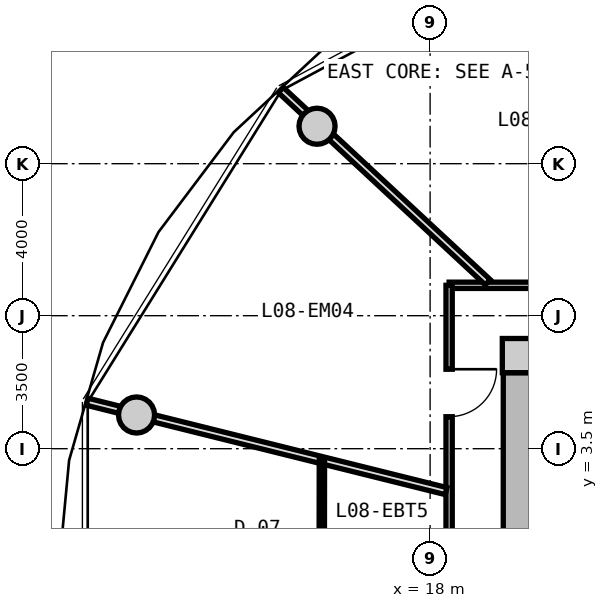
"""IFC4 building model, lengths in metres.
Left out: names, types, materials, properties, quantities, classifications, styles, units other than length and angle.
Written with IfcOpenShell. Run it as: python <this file> out.ifc"""

import sys

from ifc_helpers import new_model, si_unit, direction, frame, frame_2d, origin, origin_2d, place, context, subcontext, project, spatial, rectangle, circle, extrude, source, transform, mapped, element, fill, save


model = new_model("IFC4")
c1 = context("Model", 3, precision=1e-05, world=origin(), true_north=direction((0.0, 1.0)))
c2 = subcontext(c1, "Body", "Model", "MODEL_VIEW")
j1 = project(units=[si_unit("LENGTHUNIT", "METRE"), si_unit("PLANEANGLEUNIT", "RADIAN")], contexts=[c1])
p1 = place(None, origin())
s1 = spatial("IfcSite", under=j1, at=p1, CompositionType="ELEMENT")
p2 = place(p1, origin())
s2 = spatial("IfcBuilding", under=s1, at=p2, CompositionType="ELEMENT")
p3 = place(p2, frame((0.0, 0.0, 30.75)))
s3 = spatial("IfcBuildingStorey", under=s2, at=p3, CompositionType="ELEMENT", Elevation=30.75)
m1 = source(origin(), c2, "Body", "SweptSolid", [
    extrude(rectangle(XDim=0.9, YDim=0.9, at=origin_2d()), origin(), (0.0, 0.0, 1.0), 3.05),
])
p4 = place(p3, frame((20.35, 5.95, 0.0), z_axis=(0.0, 0.0, 1.0), x_axis=(1.0, 0.0, 0.0)))
e1 = element("IfcColumn", 1, at=p4, inside=s3, PredefinedType="COLUMN", context=c2, shape_type="MappedRepresentation", body=[
    mapped(m1, transform((0.0, 0.0, 0.0), x_axis=(1.0, 0.0, 0.0), y_axis=(0.0, 1.0, 0.0), z_axis=(0.0, 0.0, 1.0), scale=1.0)),
])
m2 = source(origin(), c2, "Body", "SweptSolid", [
    extrude(rectangle(XDim=11.0, YDim=0.85, at=frame_2d((5.5, 0.0))), origin(), (0.0, 0.0, 1.0), 2.79),
])
p5 = place(p3, frame((20.35, -5.5, 0.0), z_axis=(0.0, 0.0, 1.0), x_axis=(0.0, 1.0, 0.0)))
e2 = element("IfcWall", 2, at=p5, inside=s3, PredefinedType="SHEAR", context=c2, shape_type="MappedRepresentation", body=[
    mapped(m2, transform((0.0, 0.0, 0.0), x_axis=(1.0, 0.0, 0.0), y_axis=(0.0, 1.0, 0.0), z_axis=(0.0, 0.0, 1.0), scale=1.0)),
])
p6 = place(p5, frame((3.8, 0.0, 0.0)))
e3 = element("IfcOpeningElement", 3, at=p6, cuts=e2, PredefinedType="OPENING", context=c2, shape_type="SweptSolid", body=[
    extrude(rectangle(XDim=1.2, YDim=2.15, at=frame_2d((0.6, 1.075))), frame((0.0, 0.435, 0.0), z_axis=(0.0, -1.0, 0.0), x_axis=(1.0, 0.0, 0.0)), (0.0, 0.0, 1.0), 0.87),
])
m3 = source(origin(), c2, "Body", "SweptSolid", [
    extrude(circle(Radius=0.475, at=origin_2d()), origin(), (0.0, 0.0, 1.0), 3.05),
])
for number, where, z_axis, x_axis in (
    (4, (15.025, 11.985, 0.0), (0.0, 0.0, 1.0), (1.0, 0.0, 0.0)),
    (5, (10.275, 4.387, 0.0), (0.0, 0.0, 1.0), (1.0, 0.0, 0.0)),
):
    element("IfcColumn", number, at=place(p3, frame(where, z_axis=z_axis, x_axis=x_axis)), inside=s3, PredefinedType="COLUMN", context=c2, shape_type="MappedRepresentation", body=[
        mapped(m3, transform((0.0, 0.0, 0.0), x_axis=(1.0, 0.0, 0.0), y_axis=(0.0, 1.0, 0.0), z_axis=(0.0, 0.0, 1.0), scale=1.0)),
    ])
m4 = source(origin(), c2, "Body", "SweptSolid", [
    extrude(rectangle(XDim=19.0, YDim=0.165, at=frame_2d((9.5, 0.0))), origin(), (0.0, 0.0, 1.0), 2.775),
])
p7 = place(p3, frame((18.5, 7.8, 0.0), z_axis=(0.0, 0.0, 1.0), x_axis=(1.0, 0.0, 0.0)))
e6 = element("IfcWall", 6, at=p7, inside=s3, PredefinedType="PARTITIONING", context=c2, shape_type="MappedRepresentation", body=[
    mapped(m4, transform((0.0, 0.0, 0.0), x_axis=(1.0, 0.0, 0.0), y_axis=(0.0, 1.0, 0.0), z_axis=(0.0, 0.0, 1.0), scale=1.0)),
])
p8 = place(p7, frame((10.523, 0.0, 0.0)))
e7 = element("IfcOpeningElement", 7, at=p8, cuts=e6, PredefinedType="OPENING", context=c2, shape_type="SweptSolid", body=[
    extrude(rectangle(XDim=0.92, YDim=2.1, at=frame_2d((0.46, 1.05))), frame((0.0, 0.093, 0.0), z_axis=(0.0, -1.0, 0.0), x_axis=(1.0, 0.0, 0.0)), (0.0, 0.0, 1.0), 0.185),
])
p9 = place(p7, frame((8.226, 0.0, 0.0)))
e8 = element("IfcOpeningElement", 8, at=p9, cuts=e6, PredefinedType="OPENING", context=c2, shape_type="SweptSolid", body=[
    extrude(rectangle(XDim=0.92, YDim=2.1, at=frame_2d((0.46, 1.05))), frame((0.0, 0.093, 0.0), z_axis=(0.0, -1.0, 0.0), x_axis=(1.0, 0.0, 0.0)), (0.0, 0.0, 1.0), 0.185),
])
p10 = place(p7, frame((3.506, 0.0, 0.0)))
e9 = element("IfcOpeningElement", 9, at=p10, cuts=e6, PredefinedType="OPENING", context=c2, shape_type="SweptSolid", body=[
    extrude(rectangle(XDim=1.25, YDim=2.2, at=frame_2d((0.625, 1.1))), frame((0.0, 0.093, 0.0), z_axis=(0.0, -1.0, 0.0), x_axis=(1.0, 0.0, 0.0)), (0.0, 0.0, 1.0), 0.185),
])
p11 = place(p7, frame((12.706, 0.0, 0.0)))
e10 = element("IfcOpeningElement", 10, at=p11, cuts=e6, PredefinedType="OPENING", context=c2, shape_type="SweptSolid", body=[
    extrude(rectangle(XDim=1.05, YDim=2.15, at=frame_2d((0.525, 1.075))), frame((0.0, 0.093, 0.0), z_axis=(0.0, -1.0, 0.0), x_axis=(1.0, 0.0, 0.0)), (0.0, 0.0, 1.0), 0.185),
])
m5 = source(origin(), c2, "Body", "SweptSolid", [
    extrude(rectangle(XDim=15.6, YDim=0.165, at=frame_2d((7.8, 0.0))), origin(), (0.0, 0.0, 1.0), 2.775),
])
p12 = place(p3, frame((18.5, -7.8, 0.0), z_axis=(0.0, 0.0, 1.0), x_axis=(0.0, 1.0, 0.0)))
e11 = element("IfcWall", 11, at=p12, inside=s3, PredefinedType="PARTITIONING", context=c2, shape_type="MappedRepresentation", body=[
    mapped(m5, transform((0.0, 0.0, 0.0), x_axis=(1.0, 0.0, 0.0), y_axis=(0.0, 1.0, 0.0), z_axis=(0.0, 0.0, 1.0), scale=1.0)),
])
p13 = place(p12, frame((12.141, 0.0, 0.0)))
e12 = element("IfcOpeningElement", 12, at=p13, cuts=e11, PredefinedType="OPENING", context=c2, shape_type="SweptSolid", body=[
    extrude(rectangle(XDim=1.25, YDim=2.2, at=frame_2d((0.625, 1.1))), frame((0.0, 0.093, 0.0), z_axis=(0.0, -1.0, 0.0), x_axis=(1.0, 0.0, 0.0)), (0.0, 0.0, 1.0), 0.185),
])
p14 = place(p12, frame((3.63, 0.0, 0.0)))
e13 = element("IfcOpeningElement", 13, at=p14, cuts=e11, PredefinedType="OPENING", context=c2, shape_type="SweptSolid", body=[
    extrude(rectangle(XDim=1.05, YDim=2.15, at=frame_2d((0.525, 1.075))), frame((0.0, 0.093, 0.0), z_axis=(0.0, -1.0, 0.0), x_axis=(1.0, 0.0, 0.0)), (0.0, 0.0, 1.0), 0.185),
])
m6 = source(origin(), c2, "Body", "SweptSolid", [
    extrude(rectangle(XDim=7.435, YDim=0.19, at=frame_2d((3.717, 0.0))), origin(), (0.0, 0.0, 1.0), 2.225),
])
p15 = place(p3, frame((19.517, 7.88, 0.0), z_axis=(0.0, 0.0, 1.0), x_axis=(-0.732651956848, 0.680603489652, 0.0)))
e14 = element("IfcWall", 14, at=p15, inside=s3, PredefinedType="PARTITIONING", context=c2, shape_type="MappedRepresentation", body=[
    mapped(m6, transform((0.0, 0.0, 0.0), x_axis=(1.0, 0.0, 0.0), y_axis=(0.0, 1.0, 0.0), z_axis=(0.0, 0.0, 1.0), scale=1.0)),
])
m7 = source(origin(), c2, "Body", "SweptSolid", [
    extrude(rectangle(XDim=9.737, YDim=0.19, at=frame_2d((4.869, 0.0))), origin(), (0.0, 0.0, 1.0), 2.225),
])
p16 = place(p3, frame((18.42, 2.385, 0.0), z_axis=(0.0, 0.0, 1.0), x_axis=(-0.970392716238, 0.241532557375, 0.0)))
e15 = element("IfcWall", 15, at=p16, inside=s3, PredefinedType="PARTITIONING", context=c2, shape_type="MappedRepresentation", body=[
    mapped(m7, transform((0.0, 0.0, 0.0), x_axis=(1.0, 0.0, 0.0), y_axis=(0.0, 1.0, 0.0), z_axis=(0.0, 0.0, 1.0), scale=1.0)),
])
m8 = source(origin(), c2, "Body", "SweptSolid", [
    extrude(rectangle(XDim=2.795, YDim=0.14, at=frame_2d((1.397, 0.0))), origin(), (0.0, 0.0, 1.0), 2.775),
])
p17 = place(p3, frame((15.148, 0.419, 0.0), z_axis=(0.0, 0.0, 1.0), x_axis=(0.001659531299, 0.999998622977, 0.0)))
e16 = element("IfcWall", 16, at=p17, inside=s3, PredefinedType="PARTITIONING", context=c2, shape_type="MappedRepresentation", body=[
    mapped(m8, transform((0.0, 0.0, 0.0), x_axis=(1.0, 0.0, 0.0), y_axis=(0.0, 1.0, 0.0), z_axis=(0.0, 0.0, 1.0), scale=1.0)),
])
m9 = source(origin(), c2, "Body", "SweptSolid", [
    extrude(rectangle(XDim=1.25, YDim=2.2, at=frame_2d((0.625, 1.1))), frame((0.0, 0.025, 0.0), z_axis=(0.0, -1.0, 0.0), x_axis=(1.0, 0.0, 0.0)), (0.0, 0.0, 1.0), 0.05),
])
p18 = place(p13, frame((1.25, 0.0, 0.0), z_axis=(0.0, 0.0, 1.0), x_axis=(-1.0, 0.0, 0.0)))
e17 = element("IfcDoor", 17, at=p18, inside=s3, OperationType="SINGLE_SWING_LEFT", PredefinedType="DOOR", context=c2, shape_type="MappedRepresentation", body=[
    mapped(m9, transform((0.0, 0.0, 0.0), x_axis=(1.0, 0.0, 0.0), y_axis=(0.0, 1.0, 0.0), z_axis=(0.0, 0.0, 1.0), scale=1.0)),
])
fill(e12, e17)
save(model, sys.argv[1])
